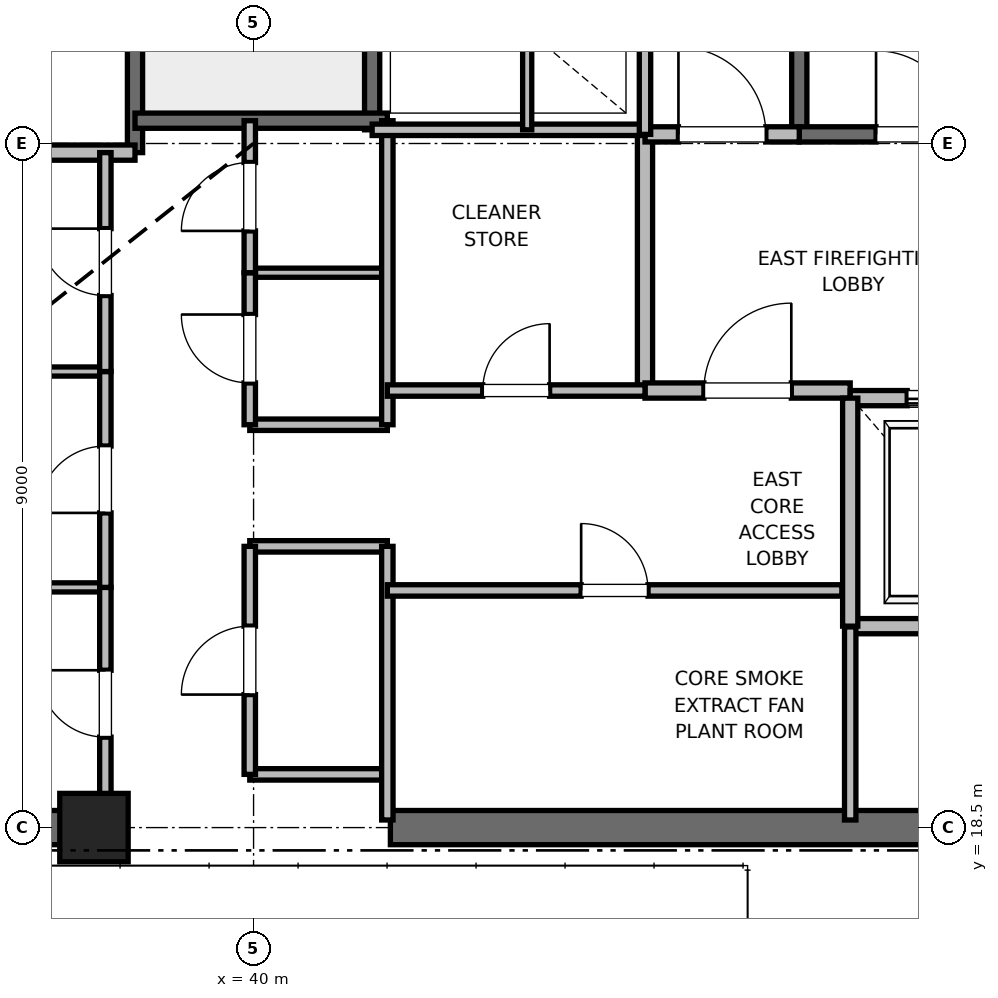
"""IFC4 building model, lengths in metres.
Left out: names, types, materials, properties, quantities, classifications, styles, units other than length and angle.
Written with IfcOpenShell. Run it as: python <this file> out.ifc"""

import sys

from ifc_helpers import new_model, si_unit, direction, frame, frame_2d, origin, origin_2d, place, context, subcontext, project, spatial, rectangle, extrude, element, fill, save


model = new_model("IFC4")
c1 = context("Model", 3, precision=1e-05, world=origin(), true_north=direction((0.0, 1.0)))
c2 = subcontext(c1, "Body", "Model", "MODEL_VIEW")
j1 = project(units=[si_unit("LENGTHUNIT", "METRE"), si_unit("PLANEANGLEUNIT", "RADIAN")], contexts=[c1])
p1 = place(None, origin())
s1 = spatial("IfcSite", under=j1, at=p1, CompositionType="ELEMENT")
p2 = place(p1, origin())
s2 = spatial("IfcBuilding", under=s1, at=p2, CompositionType="ELEMENT")
p3 = place(p2, frame((0.0, 0.0, 295.2)))
s3 = spatial("IfcBuildingStorey", under=s2, at=p3, CompositionType="ELEMENT", Elevation=295.2)
p4 = place(p3, frame((37.9, 18.5, 0.0), z_axis=(0.0, 0.0, 1.0), x_axis=(1.0, 0.0, 0.0)))
e1 = element("IfcColumn", 1, at=p4, inside=s3, PredefinedType="PILASTER", context=c2, shape_type="SweptSolid", body=[
    extrude(rectangle(XDim=0.9, YDim=0.9, at=origin_2d()), origin(), (0.0, 0.0, 1.0), 5.8),
])
for number, where, z_axis, x_axis in (
    (2, (29.0, 18.5, 0.0), (0.0, 0.0, 1.0), (1.0, 0.0, 0.0)),
    (3, (41.8, 18.5, 0.0), (0.0, 0.0, 1.0), (1.0, 0.0, 0.0)),
):
    element("IfcWall", number, at=place(p3, frame(where, z_axis=z_axis, x_axis=x_axis)), inside=s3, PredefinedType="SHEAR", context=c2, shape_type="SweptSolid", body=[
        extrude(rectangle(XDim=9.2, YDim=0.45, at=frame_2d((4.6, 0.0))), origin(), (0.0, 0.0, 1.0), 5.5),
    ])
p5 = place(p3, frame((47.18, 27.62, 0.0), z_axis=(0.0, 0.0, 1.0), x_axis=(0.0, 1.0, 0.0)))
e4 = element("IfcWall", 4, at=p5, inside=s3, PredefinedType="SOLIDWALL", context=c2, shape_type="SweptSolid", body=[
    extrude(rectangle(XDim=8.18, YDim=0.2, at=frame_2d((4.09, 0.0))), origin(), (0.0, 0.0, 1.0), 5.5),
])
p6 = place(p3, frame((47.18, 27.62, 0.0), z_axis=(0.0, 0.0, 1.0), x_axis=(1.0, 0.0, 0.0)))
e5 = element("IfcWall", 5, at=p6, inside=s3, PredefinedType="SOLIDWALL", context=c2, shape_type="SweptSolid", body=[
    extrude(rectangle(XDim=3.12, YDim=0.2, at=frame_2d((1.56, 0.0))), origin(), (0.0, 0.0, 1.0), 5.5),
])
p7 = place(p6, frame((1.01, 0.0, 0.0)))
e6 = element("IfcOpeningElement", 6, at=p7, cuts=e5, PredefinedType="OPENING", context=c2, shape_type="SweptSolid", body=[
    extrude(rectangle(XDim=1.1, YDim=2.15, at=frame_2d((0.55, 1.075))), frame((0.0, 0.1, 0.0), z_axis=(0.0, -1.0, 0.0), x_axis=(1.0, 0.0, 0.0)), (0.0, 0.0, 1.0), 0.2),
])
p8 = place(p3, frame((38.44, 27.38, 0.0), z_axis=(0.0, 0.0, 1.0), x_axis=(0.0, 1.0, 0.0)))
e7 = element("IfcWall", 7, at=p8, inside=s3, PredefinedType="SOLIDWALL", context=c2, shape_type="SweptSolid", body=[
    extrude(rectangle(XDim=8.87, YDim=0.2, at=frame_2d((4.435, 0.0))), origin(), (0.0, 0.0, 1.0), 5.5),
])
p9 = place(p3, frame((41.56, 27.68, 0.0), z_axis=(0.0, 0.0, 1.0), x_axis=(0.0, 1.0, 0.0)))
e8 = element("IfcWall", 8, at=p9, inside=s3, PredefinedType="SOLIDWALL", context=c2, shape_type="SweptSolid", body=[
    extrude(rectangle(XDim=8.57, YDim=0.2, at=frame_2d((4.285, 0.0))), origin(), (0.0, 0.0, 1.0), 5.5),
])
p10 = place(p3, frame((38.44, 27.8, 0.0), z_axis=(0.0, 0.0, 1.0), x_axis=(1.0, 0.0, 0.0)))
e9 = element("IfcWall", 9, at=p10, inside=s3, PredefinedType="SOLIDWALL", context=c2, shape_type="SweptSolid", body=[
    extrude(rectangle(XDim=3.32, YDim=0.2, at=frame_2d((1.66, 0.0))), origin(), (0.0, 0.0, 1.0), 5.5),
])
p11 = place(p3, frame((32.82, 27.38, 0.0), z_axis=(0.0, 0.0, 1.0), x_axis=(1.0, 0.0, 0.0)))
e10 = element("IfcWall", 10, at=p11, inside=s3, PredefinedType="PARTITIONING", context=c2, shape_type="SweptSolid", body=[
    extrude(rectangle(XDim=5.62, YDim=0.2, at=frame_2d((2.81, 0.0))), origin(), (0.0, 0.0, 1.0), 5.5),
])
p12 = place(p3, frame((45.15, 24.25, 0.0), z_axis=(0.0, 0.0, 1.0), x_axis=(0.0, 1.0, 0.0)))
e11 = element("IfcWall", 11, at=p12, inside=s3, PredefinedType="PARTITIONING", context=c2, shape_type="SweptSolid", body=[
    extrude(rectangle(XDim=3.37, YDim=0.2, at=frame_2d((1.685, 0.0))), origin(), (0.0, 0.0, 1.0), 5.5),
])
p13 = place(p3, frame((45.15, 24.25, 0.0), z_axis=(0.0, 0.0, 1.0), x_axis=(1.0, 0.0, 0.0)))
e12 = element("IfcWall", 12, at=p13, inside=s3, PredefinedType="PARTITIONING", context=c2, shape_type="SweptSolid", body=[
    extrude(rectangle(XDim=2.7, YDim=0.2, at=frame_2d((1.35, 0.0))), origin(), (0.0, 0.0, 1.0), 5.5),
])
p14 = place(p13, frame((0.775, 0.0, 0.0)))
e13 = element("IfcOpeningElement", 13, at=p14, cuts=e12, PredefinedType="OPENING", context=c2, shape_type="SweptSolid", body=[
    extrude(rectangle(XDim=1.15, YDim=2.2, at=frame_2d((0.575, 1.1))), frame((0.0, 0.1, 0.0), z_axis=(0.0, -1.0, 0.0), x_axis=(1.0, 0.0, 0.0)), (0.0, 0.0, 1.0), 0.2),
])
p15 = place(p3, frame((45.15, 27.62, 0.0), z_axis=(0.0, 0.0, 1.0), x_axis=(1.0, 0.0, 0.0)))
e14 = element("IfcWall", 14, at=p15, inside=s3, PredefinedType="PARTITIONING", context=c2, shape_type="SweptSolid", body=[
    extrude(rectangle(XDim=2.03, YDim=0.2, at=frame_2d((1.015, 0.0))), origin(), (0.0, 0.0, 1.0), 5.5),
])
p16 = place(p15, frame((0.44, 0.0, 0.0)))
e15 = element("IfcOpeningElement", 15, at=p16, cuts=e14, PredefinedType="OPENING", context=c2, shape_type="SweptSolid", body=[
    extrude(rectangle(XDim=1.15, YDim=2.2, at=frame_2d((0.575, 1.1))), frame((0.0, 0.1, 0.0), z_axis=(0.0, -1.0, 0.0), x_axis=(1.0, 0.0, 0.0)), (0.0, 0.0, 1.0), 0.2),
])
p17 = place(p3, frame((47.85, 21.15, 0.0), z_axis=(0.0, 0.0, 1.0), x_axis=(1.0, 0.0, 0.0)))
e16 = element("IfcWall", 16, at=p17, inside=s3, PredefinedType="SOLIDWALL", context=c2, shape_type="SweptSolid", body=[
    extrude(rectangle(XDim=2.6, YDim=0.2, at=frame_2d((1.3, 0.0))), origin(), (0.0, 0.0, 1.0), 5.5),
])
p18 = place(p3, frame((50.45, 24.15, 0.0), z_axis=(0.0, 0.0, 1.0), x_axis=(-1.0, 0.0, 0.0)))
e17 = element("IfcWall", 17, at=p18, inside=s3, PredefinedType="SOLIDWALL", context=c2, shape_type="SweptSolid", body=[
    extrude(rectangle(XDim=2.6, YDim=0.2, at=frame_2d((1.3, 0.0))), origin(), (0.0, 0.0, 1.0), 4.58),
])
p19 = place(p18, frame((0.75, 0.0, 0.0)))
e18 = element("IfcOpeningElement", 18, at=p19, cuts=e17, PredefinedType="OPENING", context=c2, shape_type="SweptSolid", body=[
    extrude(rectangle(XDim=1.1, YDim=2.2, at=frame_2d((0.55, 1.1))), frame((0.0, 0.1, 0.0), z_axis=(0.0, -1.0, 0.0), x_axis=(1.0, 0.0, 0.0)), (0.0, 0.0, 1.0), 0.2),
])
p20 = place(p3, frame((47.85, 24.15, 0.0), z_axis=(0.0, 0.0, 1.0), x_axis=(0.0, -1.0, 0.0)))
e19 = element("IfcWall", 19, at=p20, inside=s3, PredefinedType="SOLIDWALL", context=c2, shape_type="SweptSolid", body=[
    extrude(rectangle(XDim=3.0, YDim=0.2, at=frame_2d((1.5, 0.0))), origin(), (0.0, 0.0, 1.0), 5.5),
])
for number, where, z_axis, x_axis in (
    (20, (39.95, 19.2, 0.0), (0.0, 0.0, 1.0), (1.0, 0.0, 0.0)),
    (21, (39.95, 22.2, 0.0), (0.0, 0.0, 1.0), (1.0, 0.0, 0.0)),
    (22, (39.95, 23.8, 0.0), (0.0, 0.0, 1.0), (1.0, 0.0, 0.0)),
):
    element("IfcWall", number, at=place(p3, frame(where, z_axis=z_axis, x_axis=x_axis)), inside=s3, PredefinedType="PARTITIONING", context=c2, shape_type="SweptSolid", body=[
        extrude(rectangle(XDim=1.81, YDim=0.15, at=frame_2d((0.905, 0.0))), origin(), (0.0, 0.0, 1.0), 2.85),
    ])
p21 = place(p3, frame((39.95, 25.8, 0.0), z_axis=(0.0, 0.0, 1.0), x_axis=(1.0, 0.0, 0.0)))
e23 = element("IfcWall", 23, at=p21, inside=s3, PredefinedType="PARTITIONING", context=c2, shape_type="SweptSolid", body=[
    extrude(rectangle(XDim=1.81, YDim=0.12, at=frame_2d((0.905, 0.0))), origin(), (0.0, 0.0, 1.0), 2.85),
])
p22 = place(p3, frame((41.76, 18.6, 0.0), z_axis=(0.0, 0.0, 1.0), x_axis=(0.0, 1.0, 0.0)))
e24 = element("IfcWall", 24, at=p22, inside=s3, PredefinedType="PARTITIONING", context=c2, shape_type="SweptSolid", body=[
    extrude(rectangle(XDim=3.6, YDim=0.15, at=frame_2d((1.8, 0.0))), origin(), (0.0, 0.0, 1.0), 2.85),
])
p23 = place(p3, frame((41.76, 23.8, 0.0), z_axis=(0.0, 0.0, 1.0), x_axis=(0.0, 1.0, 0.0)))
e25 = element("IfcWall", 25, at=p23, inside=s3, PredefinedType="PARTITIONING", context=c2, shape_type="SweptSolid", body=[
    extrude(rectangle(XDim=4.0, YDim=0.15, at=frame_2d((2.0, 0.0))), origin(), (0.0, 0.0, 1.0), 2.85),
])
p24 = place(p3, frame((39.95, 19.2, 0.0), z_axis=(0.0, 0.0, 1.0), x_axis=(0.0, 1.0, 0.0)))
e26 = element("IfcWall", 26, at=p24, inside=s3, PredefinedType="PARTITIONING", context=c2, shape_type="SweptSolid", body=[
    extrude(rectangle(XDim=3.0, YDim=0.15, at=frame_2d((1.5, 0.0))), origin(), (0.0, 0.0, 1.0), 2.85),
])
p25 = place(p24, frame((1.05, 0.0, 0.0)))
e27 = element("IfcOpeningElement", 27, at=p25, cuts=e26, PredefinedType="OPENING", context=c2, shape_type="SweptSolid", body=[
    extrude(rectangle(XDim=0.9, YDim=2.1, at=frame_2d((0.45, 1.05))), frame((0.0, 0.075, 0.0), z_axis=(0.0, -1.0, 0.0), x_axis=(1.0, 0.0, 0.0)), (0.0, 0.0, 1.0), 0.15),
])
p26 = place(p3, frame((39.95, 23.8, 0.0), z_axis=(0.0, 0.0, 1.0), x_axis=(0.0, 1.0, 0.0)))
e28 = element("IfcWall", 28, at=p26, inside=s3, PredefinedType="PARTITIONING", context=c2, shape_type="SweptSolid", body=[
    extrude(rectangle(XDim=2.0, YDim=0.15, at=frame_2d((1.0, 0.0))), origin(), (0.0, 0.0, 1.0), 2.85),
])
p27 = place(p26, frame((0.55, 0.0, 0.0)))
e29 = element("IfcOpeningElement", 29, at=p27, cuts=e28, PredefinedType="OPENING", context=c2, shape_type="SweptSolid", body=[
    extrude(rectangle(XDim=0.9, YDim=2.1, at=frame_2d((0.45, 1.05))), frame((0.0, 0.075, 0.0), z_axis=(0.0, -1.0, 0.0), x_axis=(1.0, 0.0, 0.0)), (0.0, 0.0, 1.0), 0.15),
])
p28 = place(p3, frame((39.95, 25.8, 0.0), z_axis=(0.0, 0.0, 1.0), x_axis=(0.0, 1.0, 0.0)))
e30 = element("IfcWall", 30, at=p28, inside=s3, PredefinedType="PARTITIONING", context=c2, shape_type="SweptSolid", body=[
    extrude(rectangle(XDim=2.0, YDim=0.15, at=frame_2d((1.0, 0.0))), origin(), (0.0, 0.0, 1.0), 2.85),
])
p29 = place(p28, frame((0.55, 0.0, 0.0)))
e31 = element("IfcOpeningElement", 31, at=p29, cuts=e30, PredefinedType="OPENING", context=c2, shape_type="SweptSolid", body=[
    extrude(rectangle(XDim=0.9, YDim=2.1, at=frame_2d((0.45, 1.05))), frame((0.0, 0.075, 0.0), z_axis=(0.0, -1.0, 0.0), x_axis=(1.0, 0.0, 0.0)), (0.0, 0.0, 1.0), 0.15),
])
for number, where, z_axis, x_axis in (
    (32, (32.82, 21.66, 0.0), (0.0, 0.0, 1.0), (1.0, 0.0, 0.0)),
    (33, (32.82, 24.5, 0.0), (0.0, 0.0, 1.0), (1.0, 0.0, 0.0)),
):
    element("IfcWall", number, at=place(p3, frame(where, z_axis=z_axis, x_axis=x_axis)), inside=s3, PredefinedType="PARTITIONING", context=c2, shape_type="SweptSolid", body=[
        extrude(rectangle(XDim=5.23, YDim=0.12, at=frame_2d((2.615, 0.0))), origin(), (0.0, 0.0, 1.0), 2.85),
    ])
p30 = place(p3, frame((38.05, 18.6, 0.0), z_axis=(0.0, 0.0, 1.0), x_axis=(0.0, 1.0, 0.0)))
e34 = element("IfcWall", 34, at=p30, inside=s3, PredefinedType="PARTITIONING", context=c2, shape_type="SweptSolid", body=[
    extrude(rectangle(XDim=3.06, YDim=0.15, at=frame_2d((1.53, 0.0))), origin(), (0.0, 0.0, 1.0), 2.85),
])
p31 = place(p30, frame((1.09, 0.0, 0.0)))
e35 = element("IfcOpeningElement", 35, at=p31, cuts=e34, PredefinedType="OPENING", context=c2, shape_type="SweptSolid", body=[
    extrude(rectangle(XDim=0.88, YDim=2.1, at=frame_2d((0.44, 1.05))), frame((0.0, 0.075, 0.0), z_axis=(0.0, -1.0, 0.0), x_axis=(1.0, 0.0, 0.0)), (0.0, 0.0, 1.0), 0.15),
])
p32 = place(p3, frame((38.05, 21.66, 0.0), z_axis=(0.0, 0.0, 1.0), x_axis=(0.0, 1.0, 0.0)))
e36 = element("IfcWall", 36, at=p32, inside=s3, PredefinedType="PARTITIONING", context=c2, shape_type="SweptSolid", body=[
    extrude(rectangle(XDim=2.84, YDim=0.15, at=frame_2d((1.42, 0.0))), origin(), (0.0, 0.0, 1.0), 2.85),
])
p33 = place(p32, frame((0.98, 0.0, 0.0)))
e37 = element("IfcOpeningElement", 37, at=p33, cuts=e36, PredefinedType="OPENING", context=c2, shape_type="SweptSolid", body=[
    extrude(rectangle(XDim=0.88, YDim=2.1, at=frame_2d((0.44, 1.05))), frame((0.0, 0.075, 0.0), z_axis=(0.0, -1.0, 0.0), x_axis=(1.0, 0.0, 0.0)), (0.0, 0.0, 1.0), 0.15),
])
p34 = place(p3, frame((38.05, 24.5, 0.0), z_axis=(0.0, 0.0, 1.0), x_axis=(0.0, 1.0, 0.0)))
e38 = element("IfcWall", 38, at=p34, inside=s3, PredefinedType="PARTITIONING", context=c2, shape_type="SweptSolid", body=[
    extrude(rectangle(XDim=2.88, YDim=0.15, at=frame_2d((1.44, 0.0))), origin(), (0.0, 0.0, 1.0), 2.85),
])
p35 = place(p34, frame((1.0, 0.0, 0.0)))
e39 = element("IfcOpeningElement", 39, at=p35, cuts=e38, PredefinedType="OPENING", context=c2, shape_type="SweptSolid", body=[
    extrude(rectangle(XDim=0.88, YDim=2.1, at=frame_2d((0.44, 1.05))), frame((0.0, 0.075, 0.0), z_axis=(0.0, -1.0, 0.0), x_axis=(1.0, 0.0, 0.0)), (0.0, 0.0, 1.0), 0.15),
])
p36 = place(p3, frame((41.56, 27.68, 0.0), z_axis=(0.0, 0.0, 1.0), x_axis=(1.0, 0.0, 0.0)))
e40 = element("IfcWall", 40, at=p36, inside=s3, PredefinedType="PARTITIONING", context=c2, shape_type="SweptSolid", body=[
    extrude(rectangle(XDim=3.59, YDim=0.15, at=frame_2d((1.795, 0.0))), origin(), (0.0, 0.0, 1.0), 2.85),
])
p37 = place(p3, frame((47.85, 18.6, 0.0), z_axis=(0.0, 0.0, 1.0), x_axis=(0.0, 1.0, 0.0)))
e41 = element("IfcWall", 41, at=p37, inside=s3, PredefinedType="PARTITIONING", context=c2, shape_type="SweptSolid", body=[
    extrude(rectangle(XDim=2.54, YDim=0.15, at=frame_2d((1.27, 0.0))), origin(), (0.0, 0.0, 1.0), 2.85),
])
p38 = place(p3, frame((41.76, 21.62, 0.0), z_axis=(0.0, 0.0, 1.0), x_axis=(1.0, 0.0, 0.0)))
e42 = element("IfcWall", 42, at=p38, inside=s3, PredefinedType="PARTITIONING", context=c2, shape_type="SweptSolid", body=[
    extrude(rectangle(XDim=5.98, YDim=0.15, at=frame_2d((2.99, 0.0))), origin(), (0.0, 0.0, 1.0), 2.85),
])
p39 = place(p38, frame((2.55, 0.0, 0.0)))
e43 = element("IfcOpeningElement", 43, at=p39, cuts=e42, PredefinedType="OPENING", context=c2, shape_type="SweptSolid", body=[
    extrude(rectangle(XDim=0.88, YDim=2.1, at=frame_2d((0.44, 1.05))), frame((0.0, 0.075, 0.0), z_axis=(0.0, -1.0, 0.0), x_axis=(1.0, 0.0, 0.0)), (0.0, 0.0, 1.0), 0.15),
])
p40 = place(p3, frame((41.76, 24.25, 0.0), z_axis=(0.0, 0.0, 1.0), x_axis=(1.0, 0.0, 0.0)))
e44 = element("IfcWall", 44, at=p40, inside=s3, PredefinedType="PARTITIONING", context=c2, shape_type="SweptSolid", body=[
    extrude(rectangle(XDim=3.39, YDim=0.15, at=frame_2d((1.695, 0.0))), origin(), (0.0, 0.0, 1.0), 2.85),
])
p41 = place(p40, frame((1.255, 0.0, 0.0)))
e45 = element("IfcOpeningElement", 45, at=p41, cuts=e44, PredefinedType="OPENING", context=c2, shape_type="SweptSolid", body=[
    extrude(rectangle(XDim=0.88, YDim=2.1, at=frame_2d((0.44, 1.05))), frame((0.0, 0.075, 0.0), z_axis=(0.0, -1.0, 0.0), x_axis=(1.0, 0.0, 0.0)), (0.0, 0.0, 1.0), 0.15),
])
p42 = place(p3, frame((45.15, 27.62, 0.0), z_axis=(0.0, 0.0, 1.0), x_axis=(0.0, 1.0, 0.0)))
e46 = element("IfcWall", 46, at=p42, inside=s3, PredefinedType="PARTITIONING", context=c2, shape_type="SweptSolid", body=[
    extrude(rectangle(XDim=3.1, YDim=0.15, at=frame_2d((1.55, 0.0))), origin(), (0.0, 0.0, 1.0), 2.85),
])
p43 = place(p3, frame((43.6, 27.68, 0.0), z_axis=(0.0, 0.0, 1.0), x_axis=(0.0, 1.0, 0.0)))
e47 = element("IfcWall", 47, at=p43, inside=s3, PredefinedType="PARTITIONING", context=c2, shape_type="SweptSolid", body=[
    extrude(rectangle(XDim=3.04, YDim=0.12, at=frame_2d((1.52, 0.0))), origin(), (0.0, 0.0, 1.0), 2.85),
])
p44 = place(p7, origin())
e48 = element("IfcDoor", 48, at=p44, inside=s3, OperationType="SINGLE_SWING_LEFT", PredefinedType="DOOR", context=c2, shape_type="SweptSolid", body=[
    extrude(rectangle(XDim=1.1, YDim=2.15, at=frame_2d((0.55, 1.075))), frame((0.0, 0.025, 0.0), z_axis=(0.0, -1.0, 0.0), x_axis=(1.0, 0.0, 0.0)), (0.0, 0.0, 1.0), 0.05),
])
fill(e6, e48)
p45 = place(p14, origin())
e49 = element("IfcDoor", 49, at=p45, inside=s3, OperationType="SINGLE_SWING_RIGHT", PredefinedType="DOOR", context=c2, shape_type="SweptSolid", body=[
    extrude(rectangle(XDim=1.15, YDim=2.2, at=frame_2d((0.575, 1.1))), frame((0.0, 0.025, 0.0), z_axis=(0.0, -1.0, 0.0), x_axis=(1.0, 0.0, 0.0)), (0.0, 0.0, 1.0), 0.05),
])
fill(e13, e49)
p46 = place(p16, origin())
e50 = element("IfcDoor", 50, at=p46, inside=s3, OperationType="SINGLE_SWING_LEFT", PredefinedType="DOOR", context=c2, shape_type="SweptSolid", body=[
    extrude(rectangle(XDim=1.15, YDim=2.2, at=frame_2d((0.575, 1.1))), frame((0.0, 0.025, 0.0), z_axis=(0.0, -1.0, 0.0), x_axis=(1.0, 0.0, 0.0)), (0.0, 0.0, 1.0), 0.05),
])
fill(e15, e50)
p47 = place(p19, origin())
e51 = element("IfcDoor", 51, at=p47, inside=s3, OperationType="SLIDING_TO_RIGHT", PredefinedType="DOOR", context=c2, shape_type="SweptSolid", body=[
    extrude(rectangle(XDim=1.1, YDim=2.2, at=frame_2d((0.55, 1.1))), frame((0.0, 0.025, 0.0), z_axis=(0.0, -1.0, 0.0), x_axis=(1.0, 0.0, 0.0)), (0.0, 0.0, 1.0), 0.05),
])
fill(e18, e51)
p48 = place(p25, origin())
e52 = element("IfcDoor", 52, at=p48, inside=s3, OperationType="SINGLE_SWING_LEFT", PredefinedType="DOOR", context=c2, shape_type="SweptSolid", body=[
    extrude(rectangle(XDim=0.9, YDim=2.1, at=frame_2d((0.45, 1.05))), frame((0.0, 0.025, 0.0), z_axis=(0.0, -1.0, 0.0), x_axis=(1.0, 0.0, 0.0)), (0.0, 0.0, 1.0), 0.05),
])
fill(e27, e52)
p49 = place(p27, origin())
e53 = element("IfcDoor", 53, at=p49, inside=s3, OperationType="SINGLE_SWING_RIGHT", PredefinedType="DOOR", context=c2, shape_type="SweptSolid", body=[
    extrude(rectangle(XDim=0.9, YDim=2.1, at=frame_2d((0.45, 1.05))), frame((0.0, 0.025, 0.0), z_axis=(0.0, -1.0, 0.0), x_axis=(1.0, 0.0, 0.0)), (0.0, 0.0, 1.0), 0.05),
])
fill(e29, e53)
p50 = place(p29, origin())
e54 = element("IfcDoor", 54, at=p50, inside=s3, OperationType="SINGLE_SWING_LEFT", PredefinedType="DOOR", context=c2, shape_type="SweptSolid", body=[
    extrude(rectangle(XDim=0.9, YDim=2.1, at=frame_2d((0.45, 1.05))), frame((0.0, 0.025, 0.0), z_axis=(0.0, -1.0, 0.0), x_axis=(1.0, 0.0, 0.0)), (0.0, 0.0, 1.0), 0.05),
])
fill(e31, e54)
p51 = place(p31, origin())
e55 = element("IfcDoor", 55, at=p51, inside=s3, OperationType="SINGLE_SWING_RIGHT", PredefinedType="DOOR", context=c2, shape_type="SweptSolid", body=[
    extrude(rectangle(XDim=0.88, YDim=2.1, at=frame_2d((0.44, 1.05))), frame((0.0, 0.025, 0.0), z_axis=(0.0, -1.0, 0.0), x_axis=(1.0, 0.0, 0.0)), (0.0, 0.0, 1.0), 0.05),
])
fill(e35, e55)
p52 = place(p33, origin())
e56 = element("IfcDoor", 56, at=p52, inside=s3, OperationType="SINGLE_SWING_LEFT", PredefinedType="DOOR", context=c2, shape_type="SweptSolid", body=[
    extrude(rectangle(XDim=0.88, YDim=2.1, at=frame_2d((0.44, 1.05))), frame((0.0, 0.025, 0.0), z_axis=(0.0, -1.0, 0.0), x_axis=(1.0, 0.0, 0.0)), (0.0, 0.0, 1.0), 0.05),
])
fill(e37, e56)
p53 = place(p35, origin())
e57 = element("IfcDoor", 57, at=p53, inside=s3, OperationType="SINGLE_SWING_RIGHT", PredefinedType="DOOR", context=c2, shape_type="SweptSolid", body=[
    extrude(rectangle(XDim=0.88, YDim=2.1, at=frame_2d((0.44, 1.05))), frame((0.0, 0.025, 0.0), z_axis=(0.0, -1.0, 0.0), x_axis=(1.0, 0.0, 0.0)), (0.0, 0.0, 1.0), 0.05),
])
fill(e39, e57)
p54 = place(p39, origin())
e58 = element("IfcDoor", 58, at=p54, inside=s3, OperationType="SINGLE_SWING_LEFT", PredefinedType="DOOR", context=c2, shape_type="SweptSolid", body=[
    extrude(rectangle(XDim=0.88, YDim=2.1, at=frame_2d((0.44, 1.05))), frame((0.0, 0.025, 0.0), z_axis=(0.0, -1.0, 0.0), x_axis=(1.0, 0.0, 0.0)), (0.0, 0.0, 1.0), 0.05),
])
fill(e43, e58)
p55 = place(p41, origin())
e59 = element("IfcDoor", 59, at=p55, inside=s3, OperationType="SINGLE_SWING_RIGHT", PredefinedType="DOOR", context=c2, shape_type="SweptSolid", body=[
    extrude(rectangle(XDim=0.88, YDim=2.1, at=frame_2d((0.44, 1.05))), frame((0.0, 0.025, 0.0), z_axis=(0.0, -1.0, 0.0), x_axis=(1.0, 0.0, 0.0)), (0.0, 0.0, 1.0), 0.05),
])
fill(e45, e59)
save(model, sys.argv[1])
